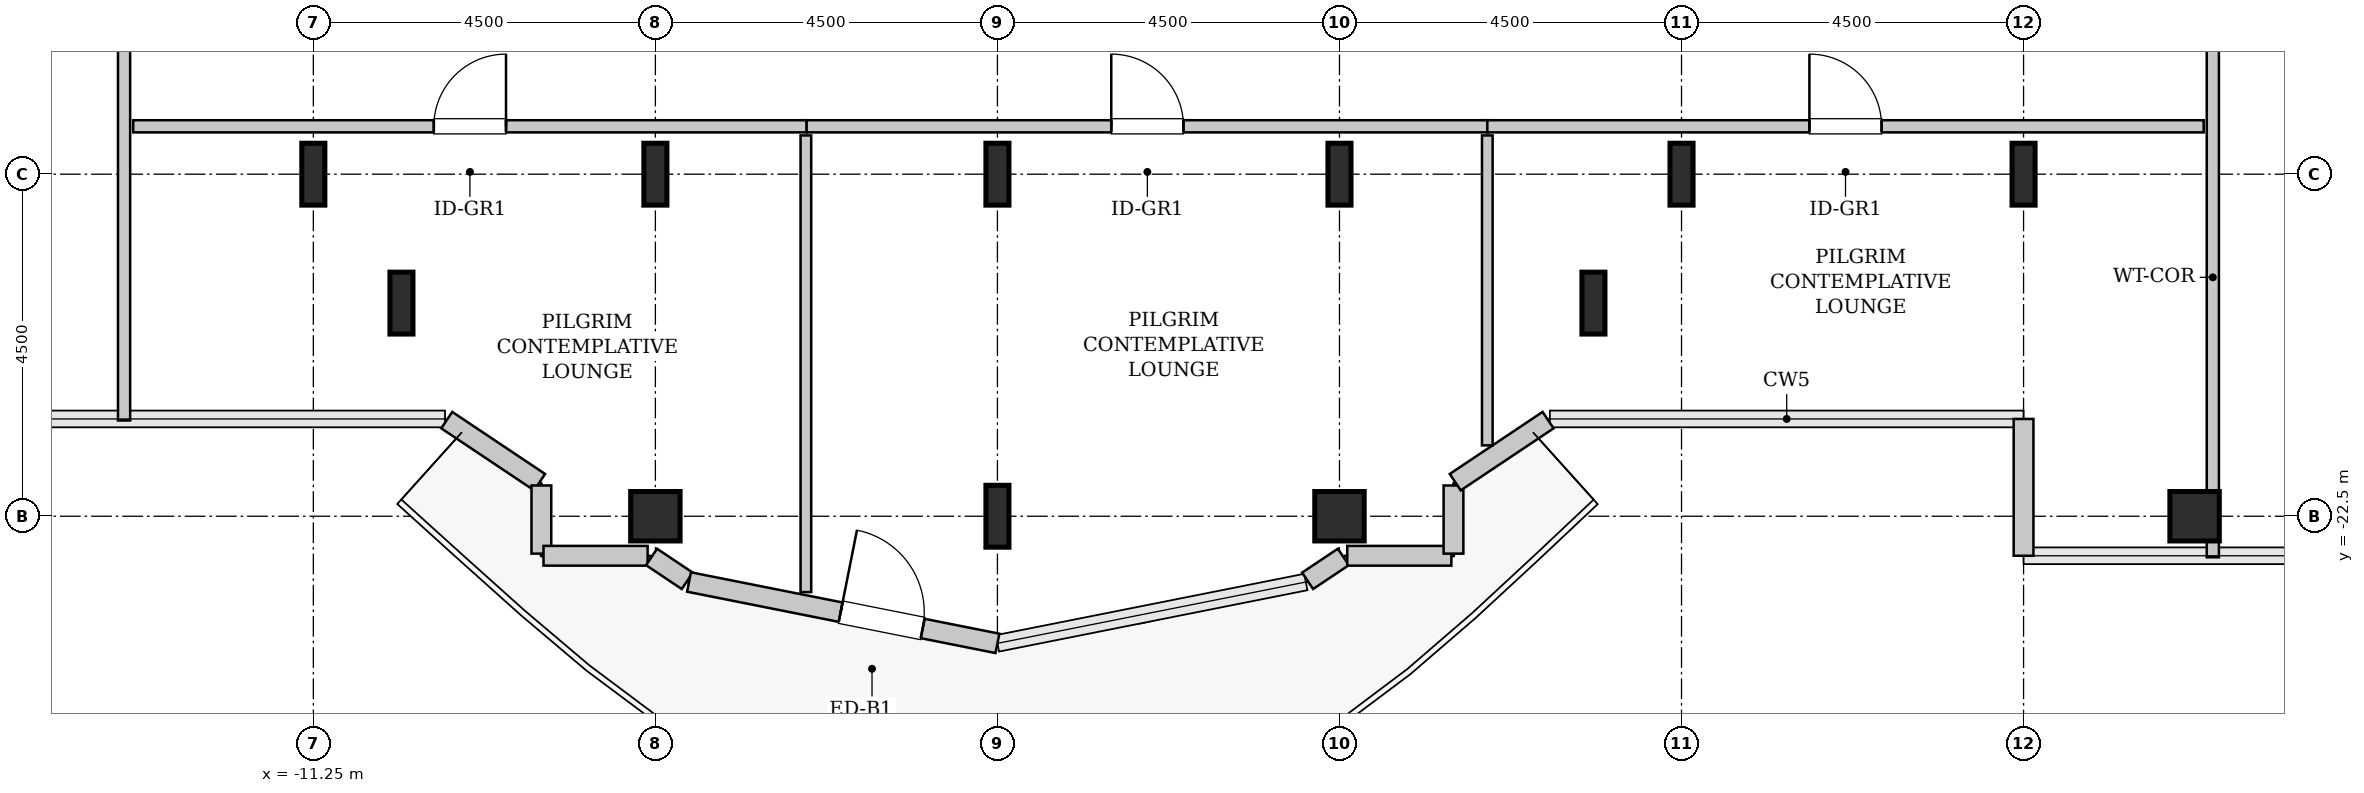
"""IFC4 building model, lengths in metres.
Left out: names, types, materials, properties, quantities, classifications, styles, units other than length and angle.
Written with IfcOpenShell. Run it as: python <this file> out.ifc"""

import sys

from ifc_helpers import new_model, si_unit, direction, frame, frame_2d, origin, origin_2d, place, context, subcontext, project, spatial, rectangle, hollow_rectangle, i_section, extrude, source, transform, mapped, element, fill, save


model = new_model("IFC4")
c1 = context("Model", 3, precision=1e-05, world=origin(), true_north=direction((0.0, 1.0)))
c2 = subcontext(c1, "Body", "Model", "MODEL_VIEW")
j1 = project(units=[si_unit("LENGTHUNIT", "METRE"), si_unit("PLANEANGLEUNIT", "RADIAN")], contexts=[c1])
p1 = place(None, origin())
s1 = spatial("IfcSite", under=j1, at=p1, CompositionType="ELEMENT")
p2 = place(p1, origin())
s2 = spatial("IfcBuilding", under=s1, at=p2, CompositionType="ELEMENT")
p3 = place(p2, frame((0.0, 0.0, 225.6)))
s3 = spatial("IfcBuildingStorey", under=s2, at=p3, CompositionType="ELEMENT", Elevation=225.6)
m1 = source(origin(), c2, "Body", "SweptSolid", [
    extrude(i_section(OverallWidth=0.303, OverallDepth=0.814, WebThickness=0.021, FlangeThickness=0.04, FilletRadius=0.03, at=origin_2d()), origin(), (0.0, 0.0, 1.0), 3.8),
])
for number, where, z_axis, x_axis in (
    (1, (-11.25, -18.0, 0.0), (0.0, 0.0, 1.0), (1.0, 0.0, 0.0)),
    (2, (-10.091, -19.696, 0.0), (0.0, 0.0, 1.0), (1.0, 0.0, 0.0)),
):
    element("IfcColumn", number, at=place(p3, frame(where, z_axis=z_axis, x_axis=x_axis)), inside=s3, PredefinedType="COLUMN", context=c2, shape_type="MappedRepresentation", body=[
        mapped(m1, transform((0.0, 0.0, 0.0), x_axis=(1.0, 0.0, 0.0), y_axis=(0.0, 1.0, 0.0), z_axis=(0.0, 0.0, 1.0), scale=1.0)),
    ])
m2 = source(origin(), c2, "Body", "SweptSolid", [
    extrude(hollow_rectangle(XDim=0.65, YDim=0.65, WallThickness=0.032, InnerFilletRadius=0.032, OuterFilletRadius=0.064, at=origin_2d()), origin(), (0.0, 0.0, 1.0), 3.8),
])
p4 = place(p3, frame((-6.75, -22.5, 0.0), z_axis=(0.0, 0.0, 1.0), x_axis=(1.0, 0.0, 0.0)))
e3 = element("IfcColumn", 3, at=p4, inside=s3, PredefinedType="COLUMN", context=c2, shape_type="MappedRepresentation", body=[
    mapped(m2, transform((0.0, 0.0, 0.0), x_axis=(1.0, 0.0, 0.0), y_axis=(0.0, 1.0, 0.0), z_axis=(0.0, 0.0, 1.0), scale=1.0)),
])
for number, where, z_axis, x_axis in (
    (4, (-6.75, -18.0, 0.0), (0.0, 0.0, 1.0), (1.0, 0.0, 0.0)),
    (5, (-2.25, -22.5, 0.0), (0.0, 0.0, 1.0), (1.0, 0.0, 0.0)),
    (6, (-2.25, -18.0, 0.0), (0.0, 0.0, 1.0), (1.0, 0.0, 0.0)),
):
    element("IfcColumn", number, at=place(p3, frame(where, z_axis=z_axis, x_axis=x_axis)), inside=s3, PredefinedType="COLUMN", context=c2, shape_type="MappedRepresentation", body=[
        mapped(m1, transform((0.0, 0.0, 0.0), x_axis=(1.0, 0.0, 0.0), y_axis=(0.0, 1.0, 0.0), z_axis=(0.0, 0.0, 1.0), scale=1.0)),
    ])
p5 = place(p3, frame((2.25, -22.5, 0.0), z_axis=(0.0, 0.0, 1.0), x_axis=(1.0, 0.0, 0.0)))
e7 = element("IfcColumn", 7, at=p5, inside=s3, PredefinedType="COLUMN", context=c2, shape_type="MappedRepresentation", body=[
    mapped(m2, transform((0.0, 0.0, 0.0), x_axis=(1.0, 0.0, 0.0), y_axis=(0.0, 1.0, 0.0), z_axis=(0.0, 0.0, 1.0), scale=1.0)),
])
for number, where, z_axis, x_axis in (
    (8, (2.25, -18.0, 0.0), (0.0, 0.0, 1.0), (1.0, 0.0, 0.0)),
    (9, (5.591, -19.696, 0.0), (0.0, 0.0, 1.0), (1.0, 0.0, 0.0)),
    (10, (6.75, -18.0, 0.0), (0.0, 0.0, 1.0), (1.0, 0.0, 0.0)),
    (11, (11.25, -18.0, 0.0), (0.0, 0.0, 1.0), (1.0, 0.0, 0.0)),
):
    element("IfcColumn", number, at=place(p3, frame(where, z_axis=z_axis, x_axis=x_axis)), inside=s3, PredefinedType="COLUMN", context=c2, shape_type="MappedRepresentation", body=[
        mapped(m1, transform((0.0, 0.0, 0.0), x_axis=(1.0, 0.0, 0.0), y_axis=(0.0, 1.0, 0.0), z_axis=(0.0, 0.0, 1.0), scale=1.0)),
    ])
p6 = place(p3, frame((13.5, -22.5, 0.0), z_axis=(0.0, 0.0, 1.0), x_axis=(1.0, 0.0, 0.0)))
e12 = element("IfcColumn", 12, at=p6, inside=s3, PredefinedType="COLUMN", context=c2, shape_type="MappedRepresentation", body=[
    mapped(m2, transform((0.0, 0.0, 0.0), x_axis=(1.0, 0.0, 0.0), y_axis=(0.0, 1.0, 0.0), z_axis=(0.0, 0.0, 1.0), scale=1.0)),
])
m3 = source(origin(), c2, "Body", "SweptSolid", [
    extrude(rectangle(XDim=1.8, YDim=0.26, at=frame_2d((0.9, 0.0))), origin(), (0.0, 0.0, 1.0), 3.55),
])
p7 = place(p3, frame((11.25, -21.22, 0.0), z_axis=(0.0, 0.0, 1.0), x_axis=(0.0, -1.0, 0.0)))
e13 = element("IfcWall", 13, at=p7, inside=s3, PredefinedType="SOLIDWALL", context=c2, shape_type="MappedRepresentation", body=[
    mapped(m3, transform((0.0, 0.0, 0.0), x_axis=(1.0, 0.0, 0.0), y_axis=(0.0, 1.0, 0.0), z_axis=(0.0, 0.0, 1.0), scale=1.0)),
])
m4 = source(origin(), c2, "Body", "SweptSolid", [
    extrude(rectangle(XDim=1.469, YDim=0.26, at=frame_2d((0.734, 0.0))), origin(), (0.0, 0.0, 1.0), 3.55),
])
p8 = place(p3, frame((-9.495, -21.236, 0.0), z_axis=(0.0, 0.0, 1.0), x_axis=(0.831461760506, -0.555581983884, 0.0)))
e14 = element("IfcWall", 14, at=p8, inside=s3, PredefinedType="SOLIDWALL", context=c2, shape_type="MappedRepresentation", body=[
    mapped(m4, transform((0.0, 0.0, 0.0), x_axis=(1.0, 0.0, 0.0), y_axis=(0.0, 1.0, 0.0), z_axis=(0.0, 0.0, 1.0), scale=1.0)),
])
m5 = source(origin(), c2, "Body", "SweptSolid", [
    extrude(rectangle(XDim=0.897, YDim=0.26, at=frame_2d((0.448, 0.0))), origin(), (0.0, 0.0, 1.0), 3.55),
])
p9 = place(p3, frame((-8.25, -22.095, 0.0), z_axis=(0.0, 0.0, 1.0), x_axis=(0.0, -1.0, 0.0)))
e15 = element("IfcWall", 15, at=p9, inside=s3, PredefinedType="SOLIDWALL", context=c2, shape_type="MappedRepresentation", body=[
    mapped(m5, transform((0.0, 0.0, 0.0), x_axis=(1.0, 0.0, 0.0), y_axis=(0.0, 1.0, 0.0), z_axis=(0.0, 0.0, 1.0), scale=1.0)),
])
m6 = source(origin(), c2, "Body", "SweptSolid", [
    extrude(rectangle(XDim=1.37, YDim=0.26, at=frame_2d((0.685, 0.0))), origin(), (0.0, 0.0, 1.0), 3.55),
])
p10 = place(p3, frame((-8.222, -23.02, 0.0), z_axis=(0.0, 0.0, 1.0), x_axis=(1.0, 0.0, 0.0)))
e16 = element("IfcWall", 16, at=p10, inside=s3, PredefinedType="SOLIDWALL", context=c2, shape_type="MappedRepresentation", body=[
    mapped(m6, transform((0.0, 0.0, 0.0), x_axis=(1.0, 0.0, 0.0), y_axis=(0.0, 1.0, 0.0), z_axis=(0.0, 0.0, 1.0), scale=1.0)),
])
m7 = source(origin(), c2, "Body", "SweptSolid", [
    extrude(rectangle(XDim=0.565, YDim=0.26, at=frame_2d((0.283, 0.0))), origin(), (0.0, 0.0, 1.0), 3.55),
])
p11 = place(p3, frame((-6.801, -23.036, 0.0), z_axis=(0.0, 0.0, 1.0), x_axis=(0.831651492666, -0.555297933317, 0.0)))
e17 = element("IfcWall", 17, at=p11, inside=s3, PredefinedType="SOLIDWALL", context=c2, shape_type="MappedRepresentation", body=[
    mapped(m7, transform((0.0, 0.0, 0.0), x_axis=(1.0, 0.0, 0.0), y_axis=(0.0, 1.0, 0.0), z_axis=(0.0, 0.0, 1.0), scale=1.0)),
])
m8 = source(origin(), c2, "Body", "SweptSolid", [
    extrude(rectangle(XDim=4.137, YDim=0.26, at=frame_2d((2.068, 0.0))), origin(), (0.0, 0.0, 1.0), 3.55),
])
p12 = place(p3, frame((-6.307, -23.365, 0.0), z_axis=(0.0, 0.0, 1.0), x_axis=(0.980782170794, -0.195105954428, 0.0)))
e18 = element("IfcWall", 18, at=p12, inside=s3, PredefinedType="SOLIDWALL", context=c2, shape_type="MappedRepresentation", body=[
    mapped(m8, transform((0.0, 0.0, 0.0), x_axis=(1.0, 0.0, 0.0), y_axis=(0.0, 1.0, 0.0), z_axis=(0.0, 0.0, 1.0), scale=1.0)),
])
p13 = place(p12, frame((2.034, 0.0, 0.0)))
e19 = element("IfcOpeningElement", 19, at=p13, cuts=e18, PredefinedType="OPENING", context=c2, shape_type="SweptSolid", body=[
    extrude(rectangle(XDim=1.1, YDim=2.2, at=frame_2d((0.55, 1.1))), frame((0.0, 0.14, 0.0), z_axis=(0.0, -1.0, 0.0), x_axis=(1.0, 0.0, 0.0)), (0.0, 0.0, 1.0), 0.28),
])
p14 = place(p3, frame((1.831, -23.35, 0.0), z_axis=(0.0, 0.0, 1.0), x_axis=(0.831651492666, 0.555297933317, 0.0)))
e20 = element("IfcWall", 20, at=p14, inside=s3, PredefinedType="SOLIDWALL", context=c2, shape_type="MappedRepresentation", body=[
    mapped(m7, transform((0.0, 0.0, 0.0), x_axis=(1.0, 0.0, 0.0), y_axis=(0.0, 1.0, 0.0), z_axis=(0.0, 0.0, 1.0), scale=1.0)),
])
p15 = place(p3, frame((2.352, -23.02, 0.0), z_axis=(0.0, 0.0, 1.0), x_axis=(1.0, 0.0, 0.0)))
e21 = element("IfcWall", 21, at=p15, inside=s3, PredefinedType="SOLIDWALL", context=c2, shape_type="MappedRepresentation", body=[
    mapped(m6, transform((0.0, 0.0, 0.0), x_axis=(1.0, 0.0, 0.0), y_axis=(0.0, 1.0, 0.0), z_axis=(0.0, 0.0, 1.0), scale=1.0)),
])
p16 = place(p3, frame((3.75, -22.992, 0.0), z_axis=(0.0, 0.0, 1.0), x_axis=(0.0, 1.0, 0.0)))
e22 = element("IfcWall", 22, at=p16, inside=s3, PredefinedType="SOLIDWALL", context=c2, shape_type="MappedRepresentation", body=[
    mapped(m5, transform((0.0, 0.0, 0.0), x_axis=(1.0, 0.0, 0.0), y_axis=(0.0, 1.0, 0.0), z_axis=(0.0, 0.0, 1.0), scale=1.0)),
])
p17 = place(p3, frame((3.773, -22.052, 0.0), z_axis=(0.0, 0.0, 1.0), x_axis=(0.831461760506, 0.555581983884, 0.0)))
e23 = element("IfcWall", 23, at=p17, inside=s3, PredefinedType="SOLIDWALL", context=c2, shape_type="MappedRepresentation", body=[
    mapped(m4, transform((0.0, 0.0, 0.0), x_axis=(1.0, 0.0, 0.0), y_axis=(0.0, 1.0, 0.0), z_axis=(0.0, 0.0, 1.0), scale=1.0)),
])
m9 = source(origin(), c2, "Body", "SweptSolid", [
    extrude(rectangle(XDim=8.353, YDim=0.16, at=frame_2d((4.176, 0.0))), origin(), (0.0, 0.0, 1.0), 3.535),
])
p18 = place(p3, frame((-13.74, -21.24, 0.0), z_axis=(0.0, 0.0, 1.0), x_axis=(0.0, 1.0, 0.0)))
e24 = element("IfcWall", 24, at=p18, inside=s3, PredefinedType="PARTITIONING", context=c2, shape_type="MappedRepresentation", body=[
    mapped(m9, transform((0.0, 0.0, 0.0), x_axis=(1.0, 0.0, 0.0), y_axis=(0.0, 1.0, 0.0), z_axis=(0.0, 0.0, 1.0), scale=1.0)),
])
p19 = place(p18, frame((5.616, 0.0, 0.0)))
e25 = element("IfcOpeningElement", 25, at=p19, cuts=e24, PredefinedType="OPENING", context=c2, shape_type="SweptSolid", body=[
    extrude(rectangle(XDim=0.95, YDim=2.1, at=frame_2d((0.475, 1.05))), frame((0.0, 0.09, 0.0), z_axis=(0.0, -1.0, 0.0), x_axis=(1.0, 0.0, 0.0)), (0.0, 0.0, 1.0), 0.18),
])
m10 = source(origin(), c2, "Body", "SweptSolid", [
    extrude(rectangle(XDim=9.953, YDim=0.16, at=frame_2d((4.976, 0.0))), origin(), (0.0, 0.0, 1.0), 3.535),
])
p20 = place(p3, frame((13.74, -23.04, 0.0), z_axis=(0.0, 0.0, 1.0), x_axis=(0.0, 1.0, 0.0)))
e26 = element("IfcWall", 26, at=p20, inside=s3, PredefinedType="PARTITIONING", context=c2, shape_type="MappedRepresentation", body=[
    mapped(m10, transform((0.0, 0.0, 0.0), x_axis=(1.0, 0.0, 0.0), y_axis=(0.0, 1.0, 0.0), z_axis=(0.0, 0.0, 1.0), scale=1.0)),
])
p21 = place(p20, frame((7.316, 0.0, 0.0)))
e27 = element("IfcOpeningElement", 27, at=p21, cuts=e26, PredefinedType="OPENING", context=c2, shape_type="SweptSolid", body=[
    extrude(rectangle(XDim=0.95, YDim=2.1, at=frame_2d((0.475, 1.05))), frame((0.0, 0.09, 0.0), z_axis=(0.0, -1.0, 0.0), x_axis=(1.0, 0.0, 0.0)), (0.0, 0.0, 1.0), 0.18),
])
m11 = source(origin(), c2, "Body", "SweptSolid", [
    extrude(rectangle(XDim=8.86, YDim=0.16, at=frame_2d((4.43, 0.0))), origin(), (0.0, 0.0, 1.0), 3.535),
])
p22 = place(p3, frame((-13.62, -17.37, 0.0), z_axis=(0.0, 0.0, 1.0), x_axis=(1.0, 0.0, 0.0)))
e28 = element("IfcWall", 28, at=p22, inside=s3, PredefinedType="PARTITIONING", context=c2, shape_type="MappedRepresentation", body=[
    mapped(m11, transform((0.0, 0.0, 0.0), x_axis=(1.0, 0.0, 0.0), y_axis=(0.0, 1.0, 0.0), z_axis=(0.0, 0.0, 1.0), scale=1.0)),
])
p23 = place(p22, frame((3.955, 0.0, 0.0)))
e29 = element("IfcOpeningElement", 29, at=p23, cuts=e28, PredefinedType="OPENING", context=c2, shape_type="SweptSolid", body=[
    extrude(rectangle(XDim=0.95, YDim=2.1, at=frame_2d((0.475, 1.05))), frame((0.0, 0.09, 0.0), z_axis=(0.0, -1.0, 0.0), x_axis=(1.0, 0.0, 0.0)), (0.0, 0.0, 1.0), 0.18),
])
m12 = source(origin(), c2, "Body", "SweptSolid", [
    extrude(rectangle(XDim=6.008, YDim=0.14, at=frame_2d((3.004, 0.0))), origin(), (0.0, 0.0, 1.0), 3.535),
])
p24 = place(p3, frame((-4.77, -23.498, 0.0), z_axis=(0.0, 0.0, 1.0), x_axis=(0.0, 1.0, 0.0)))
e30 = element("IfcWall", 30, at=p24, inside=s3, PredefinedType="PARTITIONING", context=c2, shape_type="MappedRepresentation", body=[
    mapped(m12, transform((0.0, 0.0, 0.0), x_axis=(1.0, 0.0, 0.0), y_axis=(0.0, 1.0, 0.0), z_axis=(0.0, 0.0, 1.0), scale=1.0)),
])
m13 = source(origin(), c2, "Body", "SweptSolid", [
    extrude(rectangle(XDim=8.965, YDim=0.16, at=frame_2d((4.482, 0.0))), origin(), (0.0, 0.0, 1.0), 3.535),
])
p25 = place(p3, frame((-4.76, -17.37, 0.0), z_axis=(0.0, 0.0, 1.0), x_axis=(1.0, 0.0, 0.0)))
e31 = element("IfcWall", 31, at=p25, inside=s3, PredefinedType="PARTITIONING", context=c2, shape_type="MappedRepresentation", body=[
    mapped(m13, transform((0.0, 0.0, 0.0), x_axis=(1.0, 0.0, 0.0), y_axis=(0.0, 1.0, 0.0), z_axis=(0.0, 0.0, 1.0), scale=1.0)),
])
p26 = place(p25, frame((4.008, 0.0, 0.0)))
e32 = element("IfcOpeningElement", 32, at=p26, cuts=e31, PredefinedType="OPENING", context=c2, shape_type="SweptSolid", body=[
    extrude(rectangle(XDim=0.95, YDim=2.1, at=frame_2d((0.475, 1.05))), frame((0.0, 0.09, 0.0), z_axis=(0.0, -1.0, 0.0), x_axis=(1.0, 0.0, 0.0)), (0.0, 0.0, 1.0), 0.18),
])
m14 = source(origin(), c2, "Body", "SweptSolid", [
    extrude(rectangle(XDim=4.078, YDim=0.14, at=frame_2d((2.039, 0.0))), origin(), (0.0, 0.0, 1.0), 3.535),
])
p27 = place(p3, frame((4.195, -21.568, 0.0), z_axis=(0.0, 0.0, 1.0), x_axis=(0.0, 1.0, 0.0)))
e33 = element("IfcWall", 33, at=p27, inside=s3, PredefinedType="PARTITIONING", context=c2, shape_type="MappedRepresentation", body=[
    mapped(m14, transform((0.0, 0.0, 0.0), x_axis=(1.0, 0.0, 0.0), y_axis=(0.0, 1.0, 0.0), z_axis=(0.0, 0.0, 1.0), scale=1.0)),
])
m15 = source(origin(), c2, "Body", "SweptSolid", [
    extrude(rectangle(XDim=9.425, YDim=0.16, at=frame_2d((4.712, 0.0))), origin(), (0.0, 0.0, 1.0), 3.535),
])
p28 = place(p3, frame((4.195, -17.37, 0.0), z_axis=(0.0, 0.0, 1.0), x_axis=(1.0, 0.0, 0.0)))
e34 = element("IfcWall", 34, at=p28, inside=s3, PredefinedType="PARTITIONING", context=c2, shape_type="MappedRepresentation", body=[
    mapped(m15, transform((0.0, 0.0, 0.0), x_axis=(1.0, 0.0, 0.0), y_axis=(0.0, 1.0, 0.0), z_axis=(0.0, 0.0, 1.0), scale=1.0)),
])
p29 = place(p28, frame((4.238, 0.0, 0.0)))
e35 = element("IfcOpeningElement", 35, at=p29, cuts=e34, PredefinedType="OPENING", context=c2, shape_type="SweptSolid", body=[
    extrude(rectangle(XDim=0.95, YDim=2.1, at=frame_2d((0.475, 1.05))), frame((0.0, 0.09, 0.0), z_axis=(0.0, -1.0, 0.0), x_axis=(1.0, 0.0, 0.0)), (0.0, 0.0, 1.0), 0.18),
])
m16 = source(origin(), c2, "Body", "SweptSolid", [
    extrude(rectangle(XDim=1.1, YDim=2.2, at=frame_2d((0.55, 1.1))), frame((0.0, 0.025, 0.0), z_axis=(0.0, -1.0, 0.0), x_axis=(1.0, 0.0, 0.0)), (0.0, 0.0, 1.0), 0.05),
])
p30 = place(p13, origin())
e36 = element("IfcDoor", 36, at=p30, inside=s3, OperationType="SINGLE_SWING_LEFT", PredefinedType="DOOR", context=c2, shape_type="MappedRepresentation", body=[
    mapped(m16, transform((0.0, 0.0, 0.0), x_axis=(1.0, 0.0, 0.0), y_axis=(0.0, 1.0, 0.0), z_axis=(0.0, 0.0, 1.0), scale=1.0)),
])
fill(e19, e36)
m17 = source(origin(), c2, "Body", "SweptSolid", [
    extrude(rectangle(XDim=0.95, YDim=2.1, at=frame_2d((0.475, 1.05))), frame((0.0, 0.025, 0.0), z_axis=(0.0, -1.0, 0.0), x_axis=(1.0, 0.0, 0.0)), (0.0, 0.0, 1.0), 0.05),
])
p31 = place(p23, origin())
e37 = element("IfcDoor", 37, at=p31, inside=s3, OperationType="SINGLE_SWING_RIGHT", PredefinedType="DOOR", context=c2, shape_type="MappedRepresentation", body=[
    mapped(m17, transform((0.0, 0.0, 0.0), x_axis=(1.0, 0.0, 0.0), y_axis=(0.0, 1.0, 0.0), z_axis=(0.0, 0.0, 1.0), scale=1.0)),
])
fill(e29, e37)
p32 = place(p26, origin())
e38 = element("IfcDoor", 38, at=p32, inside=s3, OperationType="SINGLE_SWING_LEFT", PredefinedType="DOOR", context=c2, shape_type="MappedRepresentation", body=[
    mapped(m17, transform((0.0, 0.0, 0.0), x_axis=(1.0, 0.0, 0.0), y_axis=(0.0, 1.0, 0.0), z_axis=(0.0, 0.0, 1.0), scale=1.0)),
])
fill(e32, e38)
p33 = place(p29, origin())
e39 = element("IfcDoor", 39, at=p33, inside=s3, OperationType="SINGLE_SWING_LEFT", PredefinedType="DOOR", context=c2, shape_type="MappedRepresentation", body=[
    mapped(m17, transform((0.0, 0.0, 0.0), x_axis=(1.0, 0.0, 0.0), y_axis=(0.0, 1.0, 0.0), z_axis=(0.0, 0.0, 1.0), scale=1.0)),
])
fill(e35, e39)
save(model, sys.argv[1])
